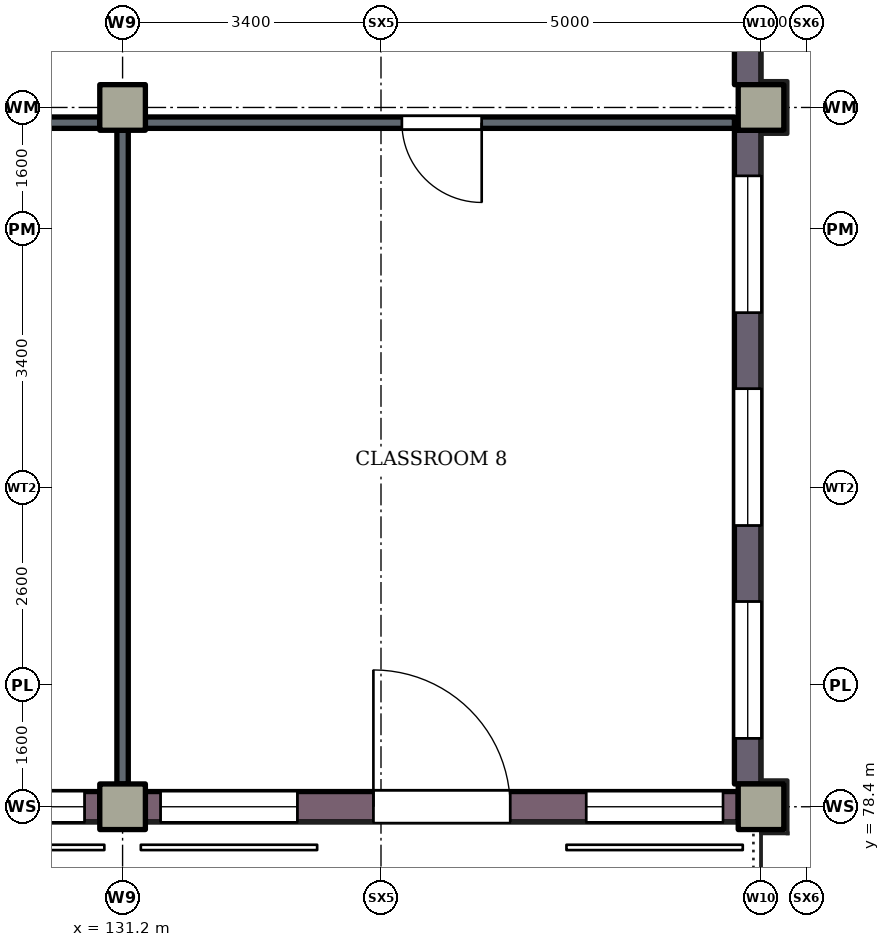
"""IFC4 building model, lengths in metres.
Left out: names, types, materials, properties, quantities, classifications, styles, units other than length and angle.
Written with IfcOpenShell. Run it as: python <this file> out.ifc"""

import sys

from ifc_helpers import new_model, si_unit, direction, frame, frame_2d, origin, origin_2d, place, context, subcontext, project, spatial, rectangle, extrude, element, fill, save


model = new_model("IFC4")
c1 = context("Model", 3, precision=1e-05, world=origin(), true_north=direction((0.0, 1.0)))
c2 = subcontext(c1, "Body", "Model", "MODEL_VIEW")
j1 = project(units=[si_unit("LENGTHUNIT", "METRE"), si_unit("PLANEANGLEUNIT", "RADIAN")], contexts=[c1])
p1 = place(None, origin())
s1 = spatial("IfcSite", under=j1, at=p1, CompositionType="ELEMENT")
p2 = place(p1, origin())
s2 = spatial("IfcBuilding", under=s1, at=p2, CompositionType="ELEMENT")
p3 = place(p2, frame((0.0, 0.0, 8.4)))
s3 = spatial("IfcBuildingStorey", under=s2, at=p3, CompositionType="ELEMENT", Elevation=8.4)
for number, where, z_axis, x_axis in (
    (1, (131.2, 87.6, 0.0), (0.0, 0.0, 1.0), (1.0, 0.0, 0.0)),
    (2, (139.6, 87.6, 0.0), (0.0, 0.0, 1.0), (1.0, 0.0, 0.0)),
    (3, (131.2, 78.4, 0.0), (0.0, 0.0, 1.0), (1.0, 0.0, 0.0)),
    (4, (139.6, 78.4, 0.0), (0.0, 0.0, 1.0), (1.0, 0.0, 0.0)),
):
    element("IfcColumn", number, at=place(p3, frame(where, z_axis=z_axis, x_axis=x_axis)), inside=s3, PredefinedType="COLUMN", context=c2, shape_type="SweptSolid", body=[
        extrude(rectangle(XDim=0.6, YDim=0.6, at=origin_2d()), origin(), (0.0, 0.0, 1.0), 4.2),
    ])
p4 = place(p3, frame((139.425, 87.3, 0.0), z_axis=(0.0, 0.0, 1.0), x_axis=(0.0, -1.0, 0.0)))
e5 = element("IfcWall", 5, at=p4, inside=s3, PredefinedType="SHEAR", context=c2, shape_type="SweptSolid", body=[
    extrude(rectangle(XDim=8.6, YDim=0.35, at=frame_2d((4.3, 0.0))), origin(), (0.0, 0.0, 1.0), 4.2),
])
p5 = place(p4, frame((6.2, 0.0, 0.9)))
e6 = element("IfcOpeningElement", 6, at=p5, cuts=e5, PredefinedType="OPENING", context=c2, shape_type="SweptSolid", body=[
    extrude(rectangle(XDim=1.8, YDim=2.1, at=frame_2d((0.9, 1.05))), frame((0.0, 0.185, 0.0), z_axis=(0.0, -1.0, 0.0), x_axis=(1.0, 0.0, 0.0)), (0.0, 0.0, 1.0), 0.37),
])
p6 = place(p4, frame((3.4, 0.0, 0.9)))
e7 = element("IfcOpeningElement", 7, at=p6, cuts=e5, PredefinedType="OPENING", context=c2, shape_type="SweptSolid", body=[
    extrude(rectangle(XDim=1.8, YDim=2.1, at=frame_2d((0.9, 1.05))), frame((0.0, 0.185, 0.0), z_axis=(0.0, -1.0, 0.0), x_axis=(1.0, 0.0, 0.0)), (0.0, 0.0, 1.0), 0.37),
])
p7 = place(p4, frame((0.6, 0.0, 0.9)))
e8 = element("IfcOpeningElement", 8, at=p7, cuts=e5, PredefinedType="OPENING", context=c2, shape_type="SweptSolid", body=[
    extrude(rectangle(XDim=1.8, YDim=2.1, at=frame_2d((0.9, 1.05))), frame((0.0, 0.185, 0.0), z_axis=(0.0, -1.0, 0.0), x_axis=(1.0, 0.0, 0.0)), (0.0, 0.0, 1.0), 0.37),
])
p8 = place(p3, frame((139.425, 97.5, 0.0), z_axis=(0.0, 0.0, 1.0), x_axis=(0.0, -1.0, 0.0)))
e9 = element("IfcWall", 9, at=p8, inside=s3, PredefinedType="SHEAR", context=c2, shape_type="SweptSolid", body=[
    extrude(rectangle(XDim=9.6, YDim=0.35, at=frame_2d((4.8, 0.0))), origin(), (0.0, 0.0, 1.0), 4.2),
])
p9 = place(p8, frame((2.5, 0.0, 0.9)))
e10 = element("IfcOpeningElement", 10, at=p9, cuts=e9, PredefinedType="OPENING", context=c2, shape_type="SweptSolid", body=[
    extrude(rectangle(XDim=1.8, YDim=2.1, at=frame_2d((0.9, 1.05))), frame((0.0, 0.185, 0.0), z_axis=(0.0, -1.0, 0.0), x_axis=(1.0, 0.0, 0.0)), (0.0, 0.0, 1.0), 0.37),
])
p10 = place(p3, frame((123.1, 78.4, 0.0), z_axis=(0.0, 0.0, 1.0), x_axis=(1.0, 0.0, 0.0)))
e11 = element("IfcWall", 11, at=p10, inside=s3, PredefinedType="SOLIDWALL", context=c2, shape_type="SweptSolid", body=[
    extrude(rectangle(XDim=7.8, YDim=0.4, at=frame_2d((3.9, 0.0))), origin(), (0.0, 0.0, 1.0), 3.32),
])
p11 = place(p10, frame((3.0, 0.0, 0.0)))
e12 = element("IfcOpeningElement", 12, at=p11, cuts=e11, PredefinedType="OPENING", context=c2, shape_type="SweptSolid", body=[
    extrude(rectangle(XDim=1.8, YDim=2.4, at=frame_2d((0.9, 1.2))), frame((0.0, 0.21, 0.0), z_axis=(0.0, -1.0, 0.0), x_axis=(1.0, 0.0, 0.0)), (0.0, 0.0, 1.0), 0.42),
])
p12 = place(p10, frame((0.2, 0.0, 0.9)))
e13 = element("IfcOpeningElement", 13, at=p12, cuts=e11, PredefinedType="OPENING", context=c2, shape_type="SweptSolid", body=[
    extrude(rectangle(XDim=1.8, YDim=1.9, at=frame_2d((0.9, 0.95))), frame((0.0, 0.21, 0.0), z_axis=(0.0, -1.0, 0.0), x_axis=(1.0, 0.0, 0.0)), (0.0, 0.0, 1.0), 0.42),
])
p13 = place(p10, frame((5.8, 0.0, 0.9)))
e14 = element("IfcOpeningElement", 14, at=p13, cuts=e11, PredefinedType="OPENING", context=c2, shape_type="SweptSolid", body=[
    extrude(rectangle(XDim=1.8, YDim=1.9, at=frame_2d((0.9, 0.95))), frame((0.0, 0.21, 0.0), z_axis=(0.0, -1.0, 0.0), x_axis=(1.0, 0.0, 0.0)), (0.0, 0.0, 1.0), 0.42),
])
p14 = place(p3, frame((131.5, 78.4, 0.0), z_axis=(0.0, 0.0, 1.0), x_axis=(1.0, 0.0, 0.0)))
e15 = element("IfcWall", 15, at=p14, inside=s3, PredefinedType="SOLIDWALL", context=c2, shape_type="SweptSolid", body=[
    extrude(rectangle(XDim=7.8, YDim=0.4, at=frame_2d((3.9, 0.0))), origin(), (0.0, 0.0, 1.0), 3.32),
])
p15 = place(p14, frame((3.0, 0.0, 0.0)))
e16 = element("IfcOpeningElement", 16, at=p15, cuts=e15, PredefinedType="OPENING", context=c2, shape_type="SweptSolid", body=[
    extrude(rectangle(XDim=1.8, YDim=2.4, at=frame_2d((0.9, 1.2))), frame((0.0, 0.21, 0.0), z_axis=(0.0, -1.0, 0.0), x_axis=(1.0, 0.0, 0.0)), (0.0, 0.0, 1.0), 0.42),
])
p16 = place(p14, frame((0.2, 0.0, 0.9)))
e17 = element("IfcOpeningElement", 17, at=p16, cuts=e15, PredefinedType="OPENING", context=c2, shape_type="SweptSolid", body=[
    extrude(rectangle(XDim=1.8, YDim=1.9, at=frame_2d((0.9, 0.95))), frame((0.0, 0.21, 0.0), z_axis=(0.0, -1.0, 0.0), x_axis=(1.0, 0.0, 0.0)), (0.0, 0.0, 1.0), 0.42),
])
p17 = place(p14, frame((5.8, 0.0, 0.9)))
e18 = element("IfcOpeningElement", 18, at=p17, cuts=e15, PredefinedType="OPENING", context=c2, shape_type="SweptSolid", body=[
    extrude(rectangle(XDim=1.8, YDim=1.9, at=frame_2d((0.9, 0.95))), frame((0.0, 0.21, 0.0), z_axis=(0.0, -1.0, 0.0), x_axis=(1.0, 0.0, 0.0)), (0.0, 0.0, 1.0), 0.42),
])
p18 = place(p3, frame((123.1, 87.4, 0.0), z_axis=(0.0, 0.0, 1.0), x_axis=(1.0, 0.0, 0.0)))
e19 = element("IfcWall", 19, at=p18, inside=s3, PredefinedType="PARTITIONING", context=c2, shape_type="SweptSolid", body=[
    extrude(rectangle(XDim=7.8, YDim=0.15, at=frame_2d((3.9, 0.0))), origin(), (0.0, 0.0, 1.0), 3.12),
])
p19 = place(p18, frame((3.375, 0.0, 0.0)))
e20 = element("IfcOpeningElement", 20, at=p19, cuts=e19, PredefinedType="OPENING", context=c2, shape_type="SweptSolid", body=[
    extrude(rectangle(XDim=1.05, YDim=2.1, at=frame_2d((0.525, 1.05))), frame((0.0, 0.085, 0.0), z_axis=(0.0, -1.0, 0.0), x_axis=(1.0, 0.0, 0.0)), (0.0, 0.0, 1.0), 0.17),
])
p20 = place(p3, frame((131.5, 87.4, 0.0), z_axis=(0.0, 0.0, 1.0), x_axis=(1.0, 0.0, 0.0)))
e21 = element("IfcWall", 21, at=p20, inside=s3, PredefinedType="PARTITIONING", context=c2, shape_type="SweptSolid", body=[
    extrude(rectangle(XDim=7.75, YDim=0.15, at=frame_2d((3.875, 0.0))), origin(), (0.0, 0.0, 1.0), 3.12),
])
p21 = place(p20, frame((3.375, 0.0, 0.0)))
e22 = element("IfcOpeningElement", 22, at=p21, cuts=e21, PredefinedType="OPENING", context=c2, shape_type="SweptSolid", body=[
    extrude(rectangle(XDim=1.05, YDim=2.1, at=frame_2d((0.525, 1.05))), frame((0.0, 0.085, 0.0), z_axis=(0.0, -1.0, 0.0), x_axis=(1.0, 0.0, 0.0)), (0.0, 0.0, 1.0), 0.17),
])
p22 = place(p3, frame((131.2, 78.7, 0.0), z_axis=(0.0, 0.0, 1.0), x_axis=(0.0, 1.0, 0.0)))
e23 = element("IfcWall", 23, at=p22, inside=s3, PredefinedType="PARTITIONING", context=c2, shape_type="SweptSolid", body=[
    extrude(rectangle(XDim=8.6, YDim=0.15, at=frame_2d((4.3, 0.0))), origin(), (0.0, 0.0, 1.0), 3.02),
])
p23 = place(p13, origin())
e24 = element("IfcWindow", 24, at=p23, inside=s3, PartitioningType="SINGLE_PANEL", PredefinedType="WINDOW", context=c2, shape_type="SweptSolid", body=[
    extrude(rectangle(XDim=1.8, YDim=1.9, at=frame_2d((0.9, 0.95))), frame((0.0, 0.03, 0.0), z_axis=(0.0, -1.0, 0.0), x_axis=(1.0, 0.0, 0.0)), (0.0, 0.0, 1.0), 0.06),
])
fill(e14, e24)
p24 = place(p15, origin())
e25 = element("IfcDoor", 25, at=p24, inside=s3, OperationType="DOUBLE_DOOR_SINGLE_SWING", PredefinedType="DOOR", context=c2, shape_type="SweptSolid", body=[
    extrude(rectangle(XDim=1.8, YDim=2.4, at=frame_2d((0.9, 1.2))), frame((0.0, 0.025, 0.0), z_axis=(0.0, -1.0, 0.0), x_axis=(1.0, 0.0, 0.0)), (0.0, 0.0, 1.0), 0.05),
])
fill(e16, e25)
p25 = place(p16, origin())
e26 = element("IfcWindow", 26, at=p25, inside=s3, PartitioningType="SINGLE_PANEL", PredefinedType="WINDOW", context=c2, shape_type="SweptSolid", body=[
    extrude(rectangle(XDim=1.8, YDim=1.9, at=frame_2d((0.9, 0.95))), frame((0.0, 0.03, 0.0), z_axis=(0.0, -1.0, 0.0), x_axis=(1.0, 0.0, 0.0)), (0.0, 0.0, 1.0), 0.06),
])
fill(e17, e26)
p26 = place(p17, origin())
e27 = element("IfcWindow", 27, at=p26, inside=s3, PartitioningType="SINGLE_PANEL", PredefinedType="WINDOW", context=c2, shape_type="SweptSolid", body=[
    extrude(rectangle(XDim=1.8, YDim=1.9, at=frame_2d((0.9, 0.95))), frame((0.0, 0.03, 0.0), z_axis=(0.0, -1.0, 0.0), x_axis=(1.0, 0.0, 0.0)), (0.0, 0.0, 1.0), 0.06),
])
fill(e18, e27)
p27 = place(p5, origin())
e28 = element("IfcWindow", 28, at=p27, inside=s3, PartitioningType="SINGLE_PANEL", PredefinedType="WINDOW", context=c2, shape_type="SweptSolid", body=[
    extrude(rectangle(XDim=1.8, YDim=2.1, at=frame_2d((0.9, 1.05))), frame((0.0, 0.03, 0.0), z_axis=(0.0, -1.0, 0.0), x_axis=(1.0, 0.0, 0.0)), (0.0, 0.0, 1.0), 0.06),
])
fill(e6, e28)
p28 = place(p6, origin())
e29 = element("IfcWindow", 29, at=p28, inside=s3, PartitioningType="SINGLE_PANEL", PredefinedType="WINDOW", context=c2, shape_type="SweptSolid", body=[
    extrude(rectangle(XDim=1.8, YDim=2.1, at=frame_2d((0.9, 1.05))), frame((0.0, 0.03, 0.0), z_axis=(0.0, -1.0, 0.0), x_axis=(1.0, 0.0, 0.0)), (0.0, 0.0, 1.0), 0.06),
])
fill(e7, e29)
p29 = place(p7, origin())
e30 = element("IfcWindow", 30, at=p29, inside=s3, PartitioningType="SINGLE_PANEL", PredefinedType="WINDOW", context=c2, shape_type="SweptSolid", body=[
    extrude(rectangle(XDim=1.8, YDim=2.1, at=frame_2d((0.9, 1.05))), frame((0.0, 0.03, 0.0), z_axis=(0.0, -1.0, 0.0), x_axis=(1.0, 0.0, 0.0)), (0.0, 0.0, 1.0), 0.06),
])
fill(e8, e30)
p30 = place(p21, origin())
e31 = element("IfcDoor", 31, at=p30, inside=s3, OperationType="SINGLE_SWING_RIGHT", PredefinedType="DOOR", context=c2, shape_type="SweptSolid", body=[
    extrude(rectangle(XDim=1.05, YDim=2.1, at=frame_2d((0.525, 1.05))), frame((0.0, 0.025, 0.0), z_axis=(0.0, -1.0, 0.0), x_axis=(1.0, 0.0, 0.0)), (0.0, 0.0, 1.0), 0.05),
])
fill(e22, e31)
save(model, sys.argv[1])
